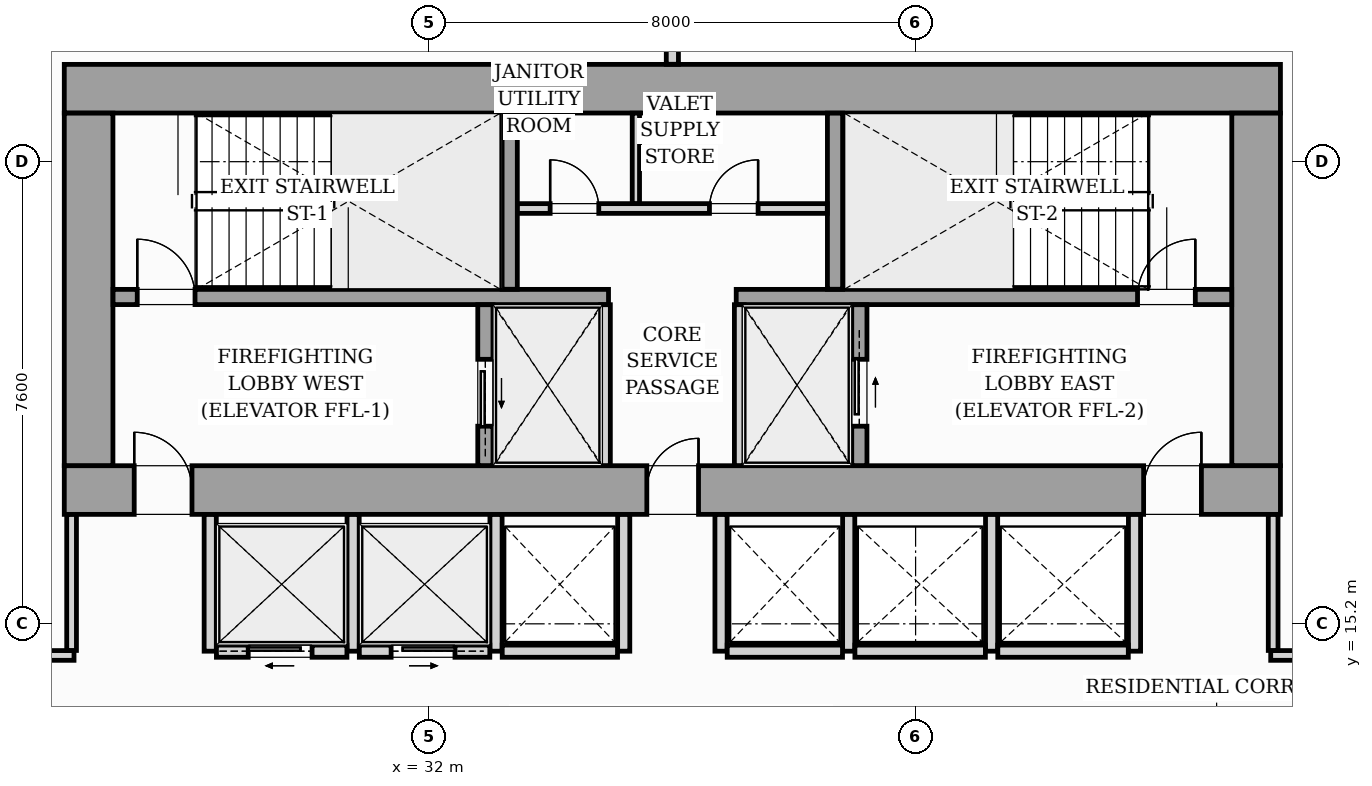
"""IFC4 building model, lengths in metres.
Left out: names, types, materials, properties, quantities, classifications, styles, units other than length and angle.
Written with IfcOpenShell. Run it as: python <this file> out.ifc"""

import sys

from ifc_helpers import new_model, si_unit, direction, frame, frame_2d, origin, origin_2d, place, context, subcontext, project, spatial, rectangle, i_section, extrude, source, transform, mapped, element, fill, save


model = new_model("IFC4")
c1 = context("Model", 3, precision=1e-05, world=origin(), true_north=direction((0.0, 1.0)))
c2 = subcontext(c1, "Body", "Model", "MODEL_VIEW")
j1 = project(units=[si_unit("LENGTHUNIT", "METRE"), si_unit("PLANEANGLEUNIT", "RADIAN")], contexts=[c1])
p1 = place(None, origin())
s1 = spatial("IfcSite", under=j1, at=p1, CompositionType="ELEMENT")
p2 = place(p1, origin())
s2 = spatial("IfcBuilding", under=s1, at=p2, CompositionType="ELEMENT")
p3 = place(p2, frame((0.0, 0.0, 32.6)))
s3 = spatial("IfcBuildingStorey", under=s2, at=p3, CompositionType="ELEMENT", Elevation=32.6)
m1 = source(origin(), c2, "Body", "SweptSolid", [
    extrude(i_section(OverallWidth=0.437, OverallDepth=0.514, WebThickness=0.061, FlangeThickness=0.097, FilletRadius=0.018, at=origin_2d()), origin(), (0.0, 0.0, 1.0), 3.196),
])
for number, where, z_axis, x_axis in (
    (1, (26.4, 17.4, 0.002), (0.0, 0.0, 1.0), (1.0, 0.0, 0.0)),
    (2, (33.12, 17.4, 0.002), (0.0, 0.0, 1.0), (1.0, 0.0, 0.0)),
    (3, (38.88, 17.4, 0.002), (0.0, 0.0, 1.0), (1.0, 0.0, 0.0)),
    (4, (45.6, 17.4, 0.002), (0.0, 0.0, 1.0), (1.0, 0.0, 0.0)),
    (5, (26.4, 24.0, 0.002), (0.0, 0.0, 1.0), (1.0, 0.0, 0.0)),
    (6, (33.12, 24.0, 0.002), (0.0, 0.0, 1.0), (1.0, 0.0, 0.0)),
    (7, (38.88, 24.0, 0.002), (0.0, 0.0, 1.0), (1.0, 0.0, 0.0)),
    (8, (45.6, 24.0, 0.002), (0.0, 0.0, 1.0), (1.0, 0.0, 0.0)),
):
    element("IfcColumn", number, at=place(p3, frame(where, z_axis=z_axis, x_axis=x_axis)), inside=s3, PredefinedType="PILASTER", context=c2, shape_type="MappedRepresentation", body=[
        mapped(m1, transform((0.0, 0.0, 0.0), scale=1.0)),
    ])
p4 = place(p3, frame((26.0, 17.4, 0.0), z_axis=(0.0, 0.0, 1.0), x_axis=(1.0, 0.0, 0.0)))
e9 = element("IfcWall", 9, at=p4, inside=s3, PredefinedType="SHEAR", context=c2, shape_type="SweptSolid", body=[
    extrude(rectangle(XDim=20.0, YDim=0.8, at=frame_2d((10.0, 0.0))), origin(), (0.0, 0.0, 1.0), 3.2),
])
p5 = place(p4, frame((1.15, 0.0, 0.0)))
e10 = element("IfcOpeningElement", 10, at=p5, cuts=e9, PredefinedType="OPENING", context=c2, shape_type="SweptSolid", body=[
    extrude(rectangle(XDim=0.95, YDim=2.06, at=frame_2d((0.475, 1.03))), frame((0.0, 0.41, 0.0), z_axis=(0.0, -1.0, 0.0), x_axis=(1.0, 0.0, 0.0)), (0.0, 0.0, 1.0), 0.82),
])
p6 = place(p4, frame((9.58, 0.0, 0.0)))
e11 = element("IfcOpeningElement", 11, at=p6, cuts=e9, PredefinedType="OPENING", context=c2, shape_type="SweptSolid", body=[
    extrude(rectangle(XDim=0.85, YDim=2.0, at=frame_2d((0.425, 1.0))), frame((0.0, 0.41, 0.0), z_axis=(0.0, -1.0, 0.0), x_axis=(1.0, 0.0, 0.0)), (0.0, 0.0, 1.0), 0.82),
])
p7 = place(p4, frame((17.75, 0.0, 0.0)))
e12 = element("IfcOpeningElement", 12, at=p7, cuts=e9, PredefinedType="OPENING", context=c2, shape_type="SweptSolid", body=[
    extrude(rectangle(XDim=0.95, YDim=2.06, at=frame_2d((0.475, 1.03))), frame((0.0, 0.41, 0.0), z_axis=(0.0, -1.0, 0.0), x_axis=(1.0, 0.0, 0.0)), (0.0, 0.0, 1.0), 0.82),
])
p8 = place(p3, frame((26.0, 24.0, 0.0), z_axis=(0.0, 0.0, 1.0), x_axis=(1.0, 0.0, 0.0)))
e13 = element("IfcWall", 13, at=p8, inside=s3, PredefinedType="SHEAR", context=c2, shape_type="SweptSolid", body=[
    extrude(rectangle(XDim=20.0, YDim=0.8, at=frame_2d((10.0, 0.0))), origin(), (0.0, 0.0, 1.0), 3.2),
])
for number, where, z_axis, x_axis in (
    (14, (26.4, 17.802, 0.0), (0.0, 0.0, 1.0), (0.0, 1.0, 0.0)),
    (15, (45.6, 17.802, 0.0), (0.0, 0.0, 1.0), (0.0, 1.0, 0.0)),
):
    element("IfcWall", number, at=place(p3, frame(where, z_axis=z_axis, x_axis=x_axis)), inside=s3, PredefinedType="SHEAR", context=c2, shape_type="SweptSolid", body=[
        extrude(rectangle(XDim=5.796, YDim=0.8, at=frame_2d((2.898, 0.0))), origin(), (0.0, 0.0, 1.0), 3.2),
    ])
p9 = place(p3, frame((26.802, 20.575, 0.0), z_axis=(0.0, 0.0, 1.0), x_axis=(1.0, 0.0, 0.0)))
e16 = element("IfcWall", 16, at=p9, inside=s3, PredefinedType="SOLIDWALL", context=c2, shape_type="SweptSolid", body=[
    extrude(rectangle(XDim=8.148, YDim=0.25, at=frame_2d((4.074, 0.0))), origin(), (0.0, 0.0, 1.0), 3.2),
])
p10 = place(p9, frame((0.398, 0.0, 0.0)))
e17 = element("IfcOpeningElement", 17, at=p10, cuts=e16, PredefinedType="OPENING", context=c2, shape_type="SweptSolid", body=[
    extrude(rectangle(XDim=0.95, YDim=2.06, at=frame_2d((0.475, 1.03))), frame((0.0, 0.135, 0.0), z_axis=(0.0, -1.0, 0.0), x_axis=(1.0, 0.0, 0.0)), (0.0, 0.0, 1.0), 0.27),
])
p11 = place(p3, frame((37.05, 20.575, 0.0), z_axis=(0.0, 0.0, 1.0), x_axis=(1.0, 0.0, 0.0)))
e18 = element("IfcWall", 18, at=p11, inside=s3, PredefinedType="SOLIDWALL", context=c2, shape_type="SweptSolid", body=[
    extrude(rectangle(XDim=8.148, YDim=0.25, at=frame_2d((4.074, 0.0))), origin(), (0.0, 0.0, 1.0), 3.2),
])
p12 = place(p11, frame((6.6, 0.0, 0.0)))
e19 = element("IfcOpeningElement", 19, at=p12, cuts=e18, PredefinedType="OPENING", context=c2, shape_type="SweptSolid", body=[
    extrude(rectangle(XDim=0.95, YDim=2.06, at=frame_2d((0.475, 1.03))), frame((0.0, 0.135, 0.0), z_axis=(0.0, -1.0, 0.0), x_axis=(1.0, 0.0, 0.0)), (0.0, 0.0, 1.0), 0.27),
])
for number, where, z_axis, x_axis in (
    (20, (33.325, 20.702, 0.0), (0.0, 0.0, 1.0), (0.0, 1.0, 0.0)),
    (21, (38.675, 20.702, 0.0), (0.0, 0.0, 1.0), (0.0, 1.0, 0.0)),
):
    element("IfcWall", number, at=place(p3, frame(where, z_axis=z_axis, x_axis=x_axis)), inside=s3, PredefinedType="SOLIDWALL", context=c2, shape_type="SweptSolid", body=[
        extrude(rectangle(XDim=2.896, YDim=0.25, at=frame_2d((1.448, 0.0))), origin(), (0.0, 0.0, 1.0), 3.2),
    ])
p13 = place(p3, frame((32.925, 17.802, 0.0), z_axis=(0.0, 0.0, 1.0), x_axis=(0.0, 1.0, 0.0)))
e22 = element("IfcWall", 22, at=p13, inside=s3, PredefinedType="SOLIDWALL", context=c2, shape_type="SweptSolid", body=[
    extrude(rectangle(XDim=2.646, YDim=0.25, at=frame_2d((1.323, 0.0))), origin(), (0.0, 0.0, 1.0), 3.2),
])
p14 = place(p13, frame((0.648, 0.0, 0.0)))
e23 = element("IfcOpeningElement", 23, at=p14, cuts=e22, PredefinedType="OPENING", context=c2, shape_type="SweptSolid", body=[
    extrude(rectangle(XDim=1.1, YDim=2.08, at=frame_2d((0.55, 1.04))), frame((0.0, 0.135, 0.0), z_axis=(0.0, -1.0, 0.0), x_axis=(1.0, 0.0, 0.0)), (0.0, 0.0, 1.0), 0.27),
])
for number, where, z_axis, x_axis in (
    (24, (34.9, 17.802, 0.0), (0.0, 0.0, 1.0), (0.0, 1.0, 0.0)),
    (25, (37.1, 17.802, 0.0), (0.0, 0.0, 1.0), (0.0, 1.0, 0.0)),
):
    element("IfcWall", number, at=place(p3, frame(where, z_axis=z_axis, x_axis=x_axis)), inside=s3, PredefinedType="PARTITIONING", context=c2, shape_type="SweptSolid", body=[
        extrude(rectangle(XDim=2.646, YDim=0.16, at=frame_2d((1.323, 0.0))), origin(), (0.0, 0.0, 1.0), 2.94),
    ])
p15 = place(p3, frame((39.075, 17.802, 0.0), z_axis=(0.0, 0.0, 1.0), x_axis=(0.0, 1.0, 0.0)))
e26 = element("IfcWall", 26, at=p15, inside=s3, PredefinedType="SOLIDWALL", context=c2, shape_type="SweptSolid", body=[
    extrude(rectangle(XDim=2.646, YDim=0.25, at=frame_2d((1.323, 0.0))), origin(), (0.0, 0.0, 1.0), 3.2),
])
p16 = place(p15, frame((0.648, 0.0, 0.0)))
e27 = element("IfcOpeningElement", 27, at=p16, cuts=e26, PredefinedType="OPENING", context=c2, shape_type="SweptSolid", body=[
    extrude(rectangle(XDim=1.1, YDim=2.08, at=frame_2d((0.55, 1.04))), frame((0.0, 0.135, 0.0), z_axis=(0.0, -1.0, 0.0), x_axis=(1.0, 0.0, 0.0)), (0.0, 0.0, 1.0), 0.27),
])
p17 = place(p3, frame((33.452, 22.03, 0.0), z_axis=(0.0, 0.0, 1.0), x_axis=(1.0, 0.0, 0.0)))
e28 = element("IfcWall", 28, at=p17, inside=s3, PredefinedType="PARTITIONING", context=c2, shape_type="SweptSolid", body=[
    extrude(rectangle(XDim=5.096, YDim=0.16, at=frame_2d((2.548, 0.0))), origin(), (0.0, 0.0, 1.0), 2.94),
])
p18 = place(p17, frame((0.538, 0.0, 0.0)))
e29 = element("IfcOpeningElement", 29, at=p18, cuts=e28, PredefinedType="OPENING", context=c2, shape_type="SweptSolid", body=[
    extrude(rectangle(XDim=0.8, YDim=2.05, at=frame_2d((0.4, 1.025))), frame((0.0, 0.09, 0.0), z_axis=(0.0, -1.0, 0.0), x_axis=(1.0, 0.0, 0.0)), (0.0, 0.0, 1.0), 0.18),
])
p19 = place(p17, frame((3.158, 0.0, 0.0)))
e30 = element("IfcOpeningElement", 30, at=p19, cuts=e28, PredefinedType="OPENING", context=c2, shape_type="SweptSolid", body=[
    extrude(rectangle(XDim=0.8, YDim=2.05, at=frame_2d((0.4, 1.025))), frame((0.0, 0.09, 0.0), z_axis=(0.0, -1.0, 0.0), x_axis=(1.0, 0.0, 0.0)), (0.0, 0.0, 1.0), 0.18),
])
p20 = place(p3, frame((35.4, 22.112, 0.0), z_axis=(0.0, 0.0, 1.0), x_axis=(0.0, 1.0, 0.0)))
e31 = element("IfcWall", 31, at=p20, inside=s3, PredefinedType="PARTITIONING", context=c2, shape_type="SweptSolid", body=[
    extrude(rectangle(XDim=1.486, YDim=0.12, at=frame_2d((0.743, 0.0))), origin(), (0.0, 0.0, 1.0), 2.94),
])
for number, where, z_axis, x_axis in (
    (32, (28.4, 14.75, 0.0), (0.0, 0.0, 1.0), (0.0, 1.0, 0.0)),
    (33, (30.75, 14.75, 0.0), (0.0, 0.0, 1.0), (0.0, 1.0, 0.0)),
    (34, (33.1, 14.75, 0.0), (0.0, 0.0, 1.0), (0.0, 1.0, 0.0)),
):
    element("IfcWall", number, at=place(p3, frame(where, z_axis=z_axis, x_axis=x_axis)), inside=s3, PredefinedType="PARTITIONING", context=c2, shape_type="SweptSolid", body=[
        extrude(rectangle(XDim=2.248, YDim=0.2, at=frame_2d((1.124, 0.0))), origin(), (0.0, 0.0, 1.0), 2.94),
    ])
p21 = place(p3, frame((28.502, 14.75, 0.0), z_axis=(0.0, 0.0, 1.0), x_axis=(1.0, 0.0, 0.0)))
e35 = element("IfcWall", 35, at=p21, inside=s3, PredefinedType="PARTITIONING", context=c2, shape_type="SweptSolid", body=[
    extrude(rectangle(XDim=2.146, YDim=0.2, at=frame_2d((1.073, 0.0))), origin(), (0.0, 0.0, 1.0), 2.94),
])
p22 = place(p21, frame((0.523, 0.0, 0.0)))
e36 = element("IfcOpeningElement", 36, at=p22, cuts=e35, PredefinedType="OPENING", context=c2, shape_type="SweptSolid", body=[
    extrude(rectangle(XDim=1.05, YDim=2.08, at=frame_2d((0.525, 1.04))), frame((0.0, 0.11, 0.0), z_axis=(0.0, -1.0, 0.0), x_axis=(1.0, 0.0, 0.0)), (0.0, 0.0, 1.0), 0.22),
])
p23 = place(p3, frame((30.852, 14.75, 0.0), z_axis=(0.0, 0.0, 1.0), x_axis=(1.0, 0.0, 0.0)))
e37 = element("IfcWall", 37, at=p23, inside=s3, PredefinedType="PARTITIONING", context=c2, shape_type="SweptSolid", body=[
    extrude(rectangle(XDim=2.146, YDim=0.2, at=frame_2d((1.073, 0.0))), origin(), (0.0, 0.0, 1.0), 2.94),
])
p24 = place(p23, frame((0.523, 0.0, 0.0)))
e38 = element("IfcOpeningElement", 38, at=p24, cuts=e37, PredefinedType="OPENING", context=c2, shape_type="SweptSolid", body=[
    extrude(rectangle(XDim=1.05, YDim=2.08, at=frame_2d((0.525, 1.04))), frame((0.0, 0.11, 0.0), z_axis=(0.0, -1.0, 0.0), x_axis=(1.0, 0.0, 0.0)), (0.0, 0.0, 1.0), 0.22),
])
p25 = place(p3, frame((35.2, 14.75, 0.0), z_axis=(0.0, 0.0, 1.0), x_axis=(0.0, 1.0, 0.0)))
e39 = element("IfcWall", 39, at=p25, inside=s3, PredefinedType="PARTITIONING", context=c2, shape_type="SweptSolid", body=[
    extrude(rectangle(XDim=2.248, YDim=0.2, at=frame_2d((1.124, 0.0))), origin(), (0.0, 0.0, 1.0), 2.94),
])
p26 = place(p3, frame((33.202, 14.75, 0.0), z_axis=(0.0, 0.0, 1.0), x_axis=(1.0, 0.0, 0.0)))
e40 = element("IfcWall", 40, at=p26, inside=s3, PredefinedType="PARTITIONING", context=c2, shape_type="SweptSolid", body=[
    extrude(rectangle(XDim=1.896, YDim=0.2, at=frame_2d((0.948, 0.0))), origin(), (0.0, 0.0, 1.0), 2.94),
])
for number, where, z_axis, x_axis in (
    (41, (36.8, 14.75, 0.0), (0.0, 0.0, 1.0), (0.0, 1.0, 0.0)),
    (42, (38.9, 14.75, 0.0), (0.0, 0.0, 1.0), (0.0, 1.0, 0.0)),
):
    element("IfcWall", number, at=place(p3, frame(where, z_axis=z_axis, x_axis=x_axis)), inside=s3, PredefinedType="PARTITIONING", context=c2, shape_type="SweptSolid", body=[
        extrude(rectangle(XDim=2.248, YDim=0.2, at=frame_2d((1.124, 0.0))), origin(), (0.0, 0.0, 1.0), 2.94),
    ])
p27 = place(p3, frame((36.902, 14.75, 0.0), z_axis=(0.0, 0.0, 1.0), x_axis=(1.0, 0.0, 0.0)))
e43 = element("IfcWall", 43, at=p27, inside=s3, PredefinedType="PARTITIONING", context=c2, shape_type="SweptSolid", body=[
    extrude(rectangle(XDim=1.896, YDim=0.2, at=frame_2d((0.948, 0.0))), origin(), (0.0, 0.0, 1.0), 2.94),
])
for number, where, z_axis, x_axis in (
    (44, (41.25, 14.75, 0.0), (0.0, 0.0, 1.0), (0.0, 1.0, 0.0)),
    (45, (43.6, 14.75, 0.0), (0.0, 0.0, 1.0), (0.0, 1.0, 0.0)),
):
    element("IfcWall", number, at=place(p3, frame(where, z_axis=z_axis, x_axis=x_axis)), inside=s3, PredefinedType="PARTITIONING", context=c2, shape_type="SweptSolid", body=[
        extrude(rectangle(XDim=2.248, YDim=0.2, at=frame_2d((1.124, 0.0))), origin(), (0.0, 0.0, 1.0), 2.94),
    ])
for number, where, z_axis, x_axis in (
    (46, (39.002, 14.75, 0.0), (0.0, 0.0, 1.0), (1.0, 0.0, 0.0)),
    (47, (41.352, 14.75, 0.0), (0.0, 0.0, 1.0), (1.0, 0.0, 0.0)),
):
    element("IfcWall", number, at=place(p3, frame(where, z_axis=z_axis, x_axis=x_axis)), inside=s3, PredefinedType="PARTITIONING", context=c2, shape_type="SweptSolid", body=[
        extrude(rectangle(XDim=2.146, YDim=0.2, at=frame_2d((1.073, 0.0))), origin(), (0.0, 0.0, 1.0), 2.94),
    ])
p28 = place(p3, frame((36.0, 24.402, 0.0), z_axis=(0.0, 0.0, 1.0), x_axis=(0.0, 1.0, 0.0)))
e48 = element("IfcWall", 48, at=p28, inside=s3, PredefinedType="PARTITIONING", context=c2, shape_type="SweptSolid", body=[
    extrude(rectangle(XDim=3.218, YDim=0.2, at=frame_2d((1.609, 0.0))), origin(), (0.0, 0.0, 1.0), 2.94),
])
p29 = place(p3, frame((18.332, 14.68, 0.0), z_axis=(0.0, 0.0, 1.0), x_axis=(1.0, 0.0, 0.0)))
e49 = element("IfcWall", 49, at=p29, inside=s3, PredefinedType="PARTITIONING", context=c2, shape_type="SweptSolid", body=[
    extrude(rectangle(XDim=7.828, YDim=0.16, at=frame_2d((3.914, 0.0))), origin(), (0.0, 0.0, 1.0), 2.94),
])
p30 = place(p29, frame((3.338, 0.0, 0.0)))
e50 = element("IfcOpeningElement", 50, at=p30, cuts=e49, PredefinedType="OPENING", context=c2, shape_type="SweptSolid", body=[
    extrude(rectangle(XDim=0.95, YDim=2.06, at=frame_2d((0.475, 1.03))), frame((0.0, 0.09, 0.0), z_axis=(0.0, -1.0, 0.0), x_axis=(1.0, 0.0, 0.0)), (0.0, 0.0, 1.0), 0.18),
])
p31 = place(p3, frame((26.12, 14.762, 0.0), z_axis=(0.0, 0.0, 1.0), x_axis=(0.0, 1.0, 0.0)))
e51 = element("IfcWall", 51, at=p31, inside=s3, PredefinedType="PARTITIONING", context=c2, shape_type="SweptSolid", body=[
    extrude(rectangle(XDim=2.236, YDim=0.16, at=frame_2d((1.118, 0.0))), origin(), (0.0, 0.0, 1.0), 2.94),
])
p32 = place(p3, frame((45.84, 14.68, 0.0), z_axis=(0.0, 0.0, 1.0), x_axis=(1.0, 0.0, 0.0)))
e52 = element("IfcWall", 52, at=p32, inside=s3, PredefinedType="PARTITIONING", context=c2, shape_type="SweptSolid", body=[
    extrude(rectangle(XDim=5.578, YDim=0.16, at=frame_2d((2.789, 0.0))), origin(), (0.0, 0.0, 1.0), 2.94),
])
p33 = place(p32, frame((2.415, 0.0, 0.0)))
e53 = element("IfcOpeningElement", 53, at=p33, cuts=e52, PredefinedType="OPENING", context=c2, shape_type="SweptSolid", body=[
    extrude(rectangle(XDim=0.95, YDim=2.06, at=frame_2d((0.475, 1.03))), frame((0.0, 0.09, 0.0), z_axis=(0.0, -1.0, 0.0), x_axis=(1.0, 0.0, 0.0)), (0.0, 0.0, 1.0), 0.18),
])
p34 = place(p3, frame((45.88, 14.762, 0.0), z_axis=(0.0, 0.0, 1.0), x_axis=(0.0, 1.0, 0.0)))
e54 = element("IfcWall", 54, at=p34, inside=s3, PredefinedType="PARTITIONING", context=c2, shape_type="SweptSolid", body=[
    extrude(rectangle(XDim=2.236, YDim=0.16, at=frame_2d((1.118, 0.0))), origin(), (0.0, 0.0, 1.0), 2.94),
])
m2 = source(origin(), c2, "Body", "SweptSolid", [
    extrude(rectangle(XDim=0.95, YDim=2.06, at=frame_2d((0.475, 1.03))), frame((0.0, 0.025, 0.0), z_axis=(0.0, -1.0, 0.0), x_axis=(1.0, 0.0, 0.0)), (0.0, 0.0, 1.0), 0.05),
])
p35 = place(p5, origin())
e55 = element("IfcDoor", 55, at=p35, inside=s3, OperationType="SINGLE_SWING_LEFT", PredefinedType="DOOR", context=c2, shape_type="MappedRepresentation", body=[
    mapped(m2, transform((0.0, 0.0, 0.0), scale=1.0)),
])
fill(e10, e55)
m3 = source(origin(), c2, "Body", "SweptSolid", [
    extrude(rectangle(XDim=0.85, YDim=2.0, at=frame_2d((0.425, 1.0))), frame((0.0, 0.025, 0.0), z_axis=(0.0, -1.0, 0.0), x_axis=(1.0, 0.0, 0.0)), (0.0, 0.0, 1.0), 0.05),
])
p36 = place(p6, origin())
e56 = element("IfcDoor", 56, at=p36, inside=s3, OperationType="SINGLE_SWING_RIGHT", PredefinedType="DOOR", context=c2, shape_type="MappedRepresentation", body=[
    mapped(m3, transform((0.0, 0.0, 0.0), scale=1.0)),
])
fill(e11, e56)
p37 = place(p7, origin())
e57 = element("IfcDoor", 57, at=p37, inside=s3, OperationType="SINGLE_SWING_RIGHT", PredefinedType="DOOR", context=c2, shape_type="MappedRepresentation", body=[
    mapped(m2, transform((0.0, 0.0, 0.0), scale=1.0)),
])
fill(e12, e57)
p38 = place(p10, origin())
e58 = element("IfcDoor", 58, at=p38, inside=s3, OperationType="SINGLE_SWING_LEFT", PredefinedType="DOOR", context=c2, shape_type="MappedRepresentation", body=[
    mapped(m2, transform((0.0, 0.0, 0.0), scale=1.0)),
])
fill(e17, e58)
p39 = place(p12, origin())
e59 = element("IfcDoor", 59, at=p39, inside=s3, OperationType="SINGLE_SWING_RIGHT", PredefinedType="DOOR", context=c2, shape_type="MappedRepresentation", body=[
    mapped(m2, transform((0.0, 0.0, 0.0), scale=1.0)),
])
fill(e19, e59)
m4 = source(origin(), c2, "Body", "SweptSolid", [
    extrude(rectangle(XDim=1.1, YDim=2.08, at=frame_2d((0.55, 1.04))), frame((0.0, 0.025, 0.0), z_axis=(0.0, -1.0, 0.0), x_axis=(1.0, 0.0, 0.0)), (0.0, 0.0, 1.0), 0.05),
])
p40 = place(p14, origin())
e60 = element("IfcDoor", 60, at=p40, inside=s3, OperationType="SLIDING_TO_LEFT", PredefinedType="DOOR", context=c2, shape_type="MappedRepresentation", body=[
    mapped(m4, transform((0.0, 0.0, 0.0), scale=1.0)),
])
fill(e23, e60)
p41 = place(p16, origin())
e61 = element("IfcDoor", 61, at=p41, inside=s3, OperationType="SLIDING_TO_RIGHT", PredefinedType="DOOR", context=c2, shape_type="MappedRepresentation", body=[
    mapped(m4, transform((0.0, 0.0, 0.0), scale=1.0)),
])
fill(e27, e61)
m5 = source(origin(), c2, "Body", "SweptSolid", [
    extrude(rectangle(XDim=0.8, YDim=2.05, at=frame_2d((0.4, 1.025))), frame((0.0, 0.025, 0.0), z_axis=(0.0, -1.0, 0.0), x_axis=(1.0, 0.0, 0.0)), (0.0, 0.0, 1.0), 0.05),
])
p42 = place(p18, origin())
e62 = element("IfcDoor", 62, at=p42, inside=s3, OperationType="SINGLE_SWING_LEFT", PredefinedType="DOOR", context=c2, shape_type="MappedRepresentation", body=[
    mapped(m5, transform((0.0, 0.0, 0.0), scale=1.0)),
])
fill(e29, e62)
p43 = place(p19, origin())
e63 = element("IfcDoor", 63, at=p43, inside=s3, OperationType="SINGLE_SWING_RIGHT", PredefinedType="DOOR", context=c2, shape_type="MappedRepresentation", body=[
    mapped(m5, transform((0.0, 0.0, 0.0), scale=1.0)),
])
fill(e30, e63)
m6 = source(origin(), c2, "Body", "SweptSolid", [
    extrude(rectangle(XDim=1.05, YDim=2.08, at=frame_2d((0.525, 1.04))), frame((0.0, 0.025, 0.0), z_axis=(0.0, -1.0, 0.0), x_axis=(1.0, 0.0, 0.0)), (0.0, 0.0, 1.0), 0.05),
])
p44 = place(p22, origin())
e64 = element("IfcDoor", 64, at=p44, inside=s3, OperationType="SLIDING_TO_LEFT", PredefinedType="DOOR", context=c2, shape_type="MappedRepresentation", body=[
    mapped(m6, transform((0.0, 0.0, 0.0), scale=1.0)),
])
fill(e36, e64)
p45 = place(p24, origin())
e65 = element("IfcDoor", 65, at=p45, inside=s3, OperationType="SLIDING_TO_RIGHT", PredefinedType="DOOR", context=c2, shape_type="MappedRepresentation", body=[
    mapped(m6, transform((0.0, 0.0, 0.0), scale=1.0)),
])
fill(e38, e65)
save(model, sys.argv[1])
